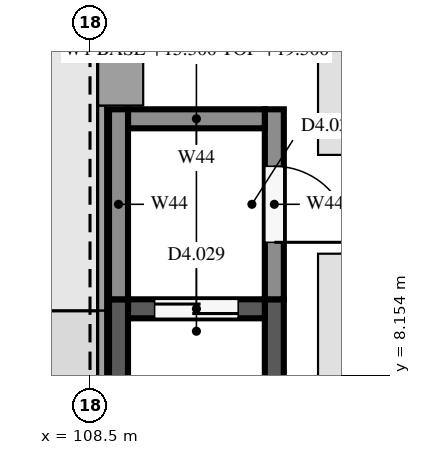
"""IFC4 building model, lengths in metres.
Left out: names, types, materials, properties, quantities, classifications, styles, units other than length and angle.
Written with IfcOpenShell. Run it as: python <this file> out.ifc"""

import sys

from ifc_helpers import new_model, si_unit, direction, frame, frame_2d, origin, place, context, subcontext, project, spatial, rectangle, extrude, element, fill, save


model = new_model("IFC4")
c1 = context("Model", 3, precision=1e-05, world=origin(), true_north=direction((0.0, 1.0)))
c2 = subcontext(c1, "Body", "Model", "MODEL_VIEW")
j1 = project(units=[si_unit("LENGTHUNIT", "METRE"), si_unit("PLANEANGLEUNIT", "RADIAN")], contexts=[c1])
p1 = place(None, origin())
s1 = spatial("IfcSite", under=j1, at=p1, CompositionType="ELEMENT")
p2 = place(p1, origin())
s2 = spatial("IfcBuilding", under=s1, at=p2, CompositionType="ELEMENT")
p3 = place(p2, frame((0.0, 0.0, 15.3)))
s3 = spatial("IfcBuildingStorey", under=s2, at=p3, CompositionType="ELEMENT", Elevation=15.3)
for number, where, z_axis, x_axis in (
    (1, (108.875, 6.25, 0.0), (0.0, 0.0, 1.0), (0.0, 1.0, 0.0)),
    (2, (110.925, 6.25, 0.0), (0.0, 0.0, 1.0), (0.0, 1.0, 0.0)),
):
    element("IfcWall", number, at=place(p3, frame(where, z_axis=z_axis, x_axis=x_axis)), inside=s3, PredefinedType="SHEAR", context=c2, shape_type="SweptSolid", body=[
        extrude(rectangle(XDim=2.9, YDim=0.25, at=frame_2d((1.45, 0.0))), origin(), (0.0, 0.0, 1.0), 4.2),
    ])
p4 = place(p3, frame((109.0, 9.025, 0.0), z_axis=(0.0, 0.0, 1.0), x_axis=(1.0, 0.0, 0.0)))
e3 = element("IfcWall", 3, at=p4, inside=s3, PredefinedType="SHEAR", context=c2, shape_type="SweptSolid", body=[
    extrude(rectangle(XDim=1.8, YDim=0.25, at=frame_2d((0.9, 0.0))), origin(), (0.0, 0.0, 1.0), 4.2),
])
p5 = place(p4, frame((0.35, 0.0, 0.0)))
e4 = element("IfcOpeningElement", 4, at=p5, cuts=e3, PredefinedType="OPENING", context=c2, shape_type="SweptSolid", body=[
    extrude(rectangle(XDim=1.1, YDim=2.1, at=frame_2d((0.55, 1.05))), frame((0.0, 0.135, 0.0), z_axis=(0.0, -1.0, 0.0), x_axis=(1.0, 0.0, 0.0)), (0.0, 0.0, 1.0), 0.27),
])
p6 = place(p3, frame((108.875, 9.15, 0.0), z_axis=(0.0, 0.0, 1.0), x_axis=(0.0, 1.0, 0.0)))
e5 = element("IfcWall", 5, at=p6, inside=s3, PredefinedType="SOLIDWALL", context=c2, shape_type="SweptSolid", body=[
    extrude(rectangle(XDim=2.5, YDim=0.25, at=frame_2d((1.25, 0.0))), origin(), (0.0, 0.0, 1.0), 4.2),
])
p7 = place(p3, frame((110.925, 11.65, 0.0), z_axis=(0.0, 0.0, 1.0), x_axis=(0.0, -1.0, 0.0)))
e6 = element("IfcWall", 6, at=p7, inside=s3, PredefinedType="SOLIDWALL", context=c2, shape_type="SweptSolid", body=[
    extrude(rectangle(XDim=2.5, YDim=0.25, at=frame_2d((1.25, 0.0))), origin(), (0.0, 0.0, 1.0), 4.2),
])
p8 = place(p7, frame((0.75, 0.0, 0.0)))
e7 = element("IfcOpeningElement", 7, at=p8, cuts=e6, PredefinedType="OPENING", context=c2, shape_type="SweptSolid", body=[
    extrude(rectangle(XDim=1.0, YDim=2.1, at=frame_2d((0.5, 1.05))), frame((0.0, 0.135, 0.0), z_axis=(0.0, -1.0, 0.0), x_axis=(1.0, 0.0, 0.0)), (0.0, 0.0, 1.0), 0.27),
])
p9 = place(p3, frame((109.0, 11.525, 0.0), z_axis=(0.0, 0.0, 1.0), x_axis=(1.0, 0.0, 0.0)))
e8 = element("IfcWall", 8, at=p9, inside=s3, PredefinedType="SOLIDWALL", context=c2, shape_type="SweptSolid", body=[
    extrude(rectangle(XDim=1.8, YDim=0.25, at=frame_2d((0.9, 0.0))), origin(), (0.0, 0.0, 1.0), 4.2),
])
p10 = place(p8, origin())
e9 = element("IfcDoor", 9, at=p10, inside=s3, OperationType="SINGLE_SWING_RIGHT", PredefinedType="DOOR", context=c2, shape_type="SweptSolid", body=[
    extrude(rectangle(XDim=1.0, YDim=2.1, at=frame_2d((0.5, 1.05))), frame((0.0, 0.025, 0.0), z_axis=(0.0, -1.0, 0.0), x_axis=(1.0, 0.0, 0.0)), (0.0, 0.0, 1.0), 0.05),
])
fill(e7, e9)
p11 = place(p5, origin())
e10 = element("IfcDoor", 10, at=p11, inside=s3, OperationType="SLIDING_TO_LEFT", PredefinedType="DOOR", context=c2, shape_type="SweptSolid", body=[
    extrude(rectangle(XDim=1.1, YDim=2.1, at=frame_2d((0.55, 1.05))), frame((0.0, 0.025, 0.0), z_axis=(0.0, -1.0, 0.0), x_axis=(1.0, 0.0, 0.0)), (0.0, 0.0, 1.0), 0.05),
])
fill(e4, e10)
save(model, sys.argv[1])
